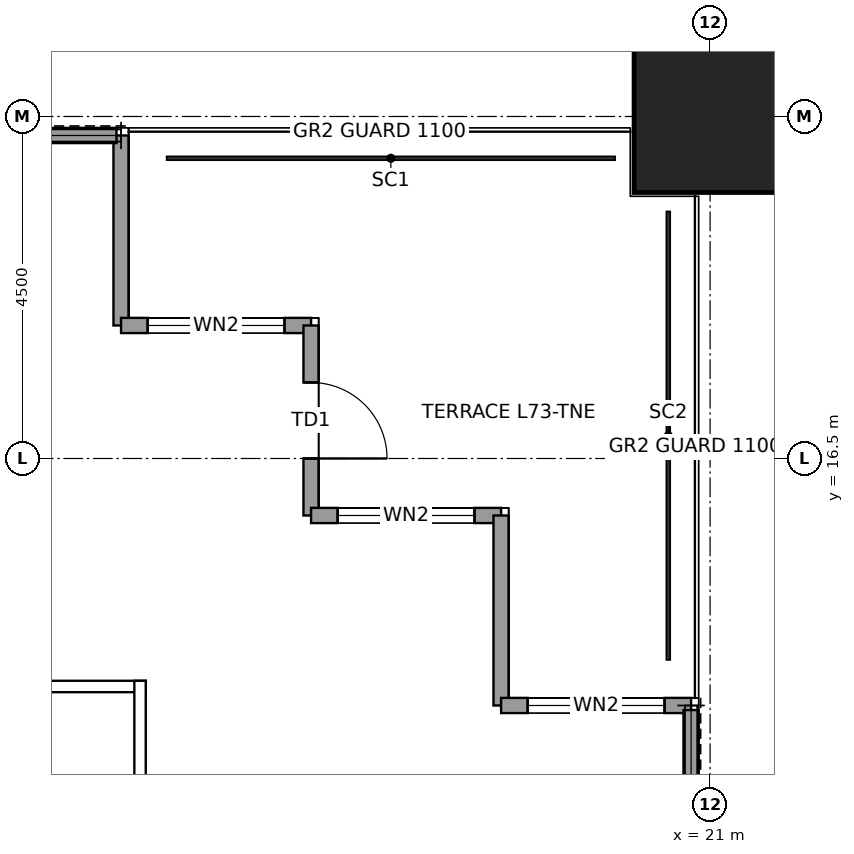
"""IFC4 building model, lengths in metres.
Left out: names, types, materials, properties, quantities, classifications, styles, units other than length and angle.
Written with IfcOpenShell. Run it as: python <this file> out.ifc"""

import sys

from ifc_helpers import new_model, si_unit, direction, frame, frame_2d, origin, origin_2d, place, context, subcontext, project, spatial, rectangle, hollow_rectangle, extrude, element, fill, save


model = new_model("IFC4")
c1 = context("Model", 3, precision=1e-05, world=origin(), true_north=direction((0.0, 1.0)))
c2 = subcontext(c1, "Body", "Model", "MODEL_VIEW")
j1 = project(units=[si_unit("LENGTHUNIT", "METRE"), si_unit("PLANEANGLEUNIT", "RADIAN")], contexts=[c1])
p1 = place(None, origin())
s1 = spatial("IfcSite", under=j1, at=p1, CompositionType="ELEMENT")
p2 = place(p1, origin())
s2 = spatial("IfcBuilding", under=s1, at=p2, CompositionType="ELEMENT")
p3 = place(p2, frame((0.0, 0.0, 327.9)))
s3 = spatial("IfcBuildingStorey", under=s2, at=p3, CompositionType="ELEMENT", Elevation=327.9)
p4 = place(p3, frame((21.0, 21.0, 0.0), z_axis=(0.0, 0.0, 1.0), x_axis=(1.0, 0.0, 0.0)))
e1 = element("IfcColumn", 1, at=p4, inside=s3, PredefinedType="COLUMN", context=c2, shape_type="SweptSolid", body=[
    extrude(hollow_rectangle(XDim=2.0, YDim=2.0, WallThickness=0.095, at=origin_2d()), origin(), (0.0, 0.0, 1.0), 4.0),
])
p5 = place(p3, frame((13.25, 20.75, 0.0), z_axis=(0.0, 0.0, 1.0), x_axis=(0.0, -1.0, 0.0)))
e2 = element("IfcWall", 2, at=p5, inside=s3, PredefinedType="SOLIDWALL", context=c2, shape_type="SweptSolid", body=[
    extrude(rectangle(XDim=2.5, YDim=0.2, at=frame_2d((1.25, 0.0))), origin(), (0.0, 0.0, 1.0), 3.85),
])
p6 = place(p3, frame((13.25, 18.25, 0.0), z_axis=(0.0, 0.0, 1.0), x_axis=(1.0, 0.0, 0.0)))
e3 = element("IfcWall", 3, at=p6, inside=s3, PredefinedType="SOLIDWALL", context=c2, shape_type="SweptSolid", body=[
    extrude(rectangle(XDim=2.5, YDim=0.2, at=frame_2d((1.25, 0.0))), origin(), (0.0, 0.0, 1.0), 3.85),
])
p7 = place(p6, frame((0.35, 0.0, 0.3)))
e4 = element("IfcOpeningElement", 4, at=p7, cuts=e3, PredefinedType="OPENING", context=c2, shape_type="SweptSolid", body=[
    extrude(rectangle(XDim=1.8, YDim=2.4, at=frame_2d((0.9, 1.2))), frame((0.0, 0.11, 0.0), z_axis=(0.0, -1.0, 0.0), x_axis=(1.0, 0.0, 0.0)), (0.0, 0.0, 1.0), 0.22),
])
p8 = place(p3, frame((15.75, 18.25, 0.0), z_axis=(0.0, 0.0, 1.0), x_axis=(0.0, -1.0, 0.0)))
e5 = element("IfcWall", 5, at=p8, inside=s3, PredefinedType="SOLIDWALL", context=c2, shape_type="SweptSolid", body=[
    extrude(rectangle(XDim=2.5, YDim=0.2, at=frame_2d((1.25, 0.0))), origin(), (0.0, 0.0, 1.0), 3.317),
])
p9 = place(p8, frame((0.75, 0.0, 0.0)))
e6 = element("IfcOpeningElement", 6, at=p9, cuts=e5, PredefinedType="OPENING", context=c2, shape_type="SweptSolid", body=[
    extrude(rectangle(XDim=1.0, YDim=2.4, at=frame_2d((0.5, 1.2))), frame((0.0, 0.11, 0.0), z_axis=(0.0, -1.0, 0.0), x_axis=(1.0, 0.0, 0.0)), (0.0, 0.0, 1.0), 0.22),
])
p10 = place(p3, frame((15.75, 15.75, 0.0), z_axis=(0.0, 0.0, 1.0), x_axis=(1.0, 0.0, 0.0)))
e7 = element("IfcWall", 7, at=p10, inside=s3, PredefinedType="SOLIDWALL", context=c2, shape_type="SweptSolid", body=[
    extrude(rectangle(XDim=2.5, YDim=0.2, at=frame_2d((1.25, 0.0))), origin(), (0.0, 0.0, 1.0), 3.85),
])
p11 = place(p10, frame((0.35, 0.0, 0.3)))
e8 = element("IfcOpeningElement", 8, at=p11, cuts=e7, PredefinedType="OPENING", context=c2, shape_type="SweptSolid", body=[
    extrude(rectangle(XDim=1.8, YDim=2.4, at=frame_2d((0.9, 1.2))), frame((0.0, 0.11, 0.0), z_axis=(0.0, -1.0, 0.0), x_axis=(1.0, 0.0, 0.0)), (0.0, 0.0, 1.0), 0.22),
])
p12 = place(p3, frame((18.25, 15.75, 0.0), z_axis=(0.0, 0.0, 1.0), x_axis=(0.0, -1.0, 0.0)))
e9 = element("IfcWall", 9, at=p12, inside=s3, PredefinedType="SOLIDWALL", context=c2, shape_type="SweptSolid", body=[
    extrude(rectangle(XDim=2.5, YDim=0.2, at=frame_2d((1.25, 0.0))), origin(), (0.0, 0.0, 1.0), 3.85),
])
p13 = place(p3, frame((18.25, 13.25, 0.0), z_axis=(0.0, 0.0, 1.0), x_axis=(1.0, 0.0, 0.0)))
e10 = element("IfcWall", 10, at=p13, inside=s3, PredefinedType="SOLIDWALL", context=c2, shape_type="SweptSolid", body=[
    extrude(rectangle(XDim=2.5, YDim=0.2, at=frame_2d((1.25, 0.0))), origin(), (0.0, 0.0, 1.0), 3.85),
])
p14 = place(p13, frame((0.35, 0.0, 0.3)))
e11 = element("IfcOpeningElement", 11, at=p14, cuts=e10, PredefinedType="OPENING", context=c2, shape_type="SweptSolid", body=[
    extrude(rectangle(XDim=1.8, YDim=2.4, at=frame_2d((0.9, 1.2))), frame((0.0, 0.11, 0.0), z_axis=(0.0, -1.0, 0.0), x_axis=(1.0, 0.0, 0.0)), (0.0, 0.0, 1.0), 0.22),
])
for number, where, z_axis, x_axis in (
    (12, (10.435, 20.75, 0.0), (0.0, 0.0, 1.0), (1.0, 0.0, 0.0)),
    (13, (20.75, 13.19, 0.0), (0.0, 0.0, 1.0), (0.0, -1.0, 0.0)),
):
    element("IfcWall", number, at=place(p3, frame(where, z_axis=z_axis, x_axis=x_axis)), inside=s3, PredefinedType="SOLIDWALL", context=c2, shape_type="SweptSolid", body=[
        extrude(rectangle(XDim=2.755, YDim=0.2, at=frame_2d((1.377, 0.0))), origin(), (0.0, 0.0, 1.0), 3.85),
    ])
p15 = place(p3, frame((4.925, 13.5, 0.0), z_axis=(0.0, 0.0, 1.0), x_axis=(1.0, 0.0, 0.0)))
e14 = element("IfcWall", 14, at=p15, inside=s3, PredefinedType="PARTITIONING", context=c2, shape_type="SweptSolid", body=[
    extrude(rectangle(XDim=8.65, YDim=0.15, at=frame_2d((4.325, 0.0))), origin(), (0.0, 0.0, 1.0), 3.85),
])
p16 = place(p3, frame((13.5, 4.925, 0.0), z_axis=(0.0, 0.0, 1.0), x_axis=(0.0, 1.0, 0.0)))
e15 = element("IfcWall", 15, at=p16, inside=s3, PredefinedType="PARTITIONING", context=c2, shape_type="SweptSolid", body=[
    extrude(rectangle(XDim=8.65, YDim=0.15, at=frame_2d((4.325, 0.0))), origin(), (0.0, 0.0, 1.0), 3.85),
])
p17 = place(p16, frame((3.825, 0.0, 0.0)))
e16 = element("IfcOpeningElement", 16, at=p17, cuts=e15, PredefinedType="OPENING", context=c2, shape_type="SweptSolid", body=[
    extrude(rectangle(XDim=1.0, YDim=2.4, at=frame_2d((0.5, 1.2))), frame((0.0, 0.085, 0.0), z_axis=(0.0, -1.0, 0.0), x_axis=(1.0, 0.0, 0.0)), (0.0, 0.0, 1.0), 0.17),
])
p18 = place(p7, origin())
e17 = element("IfcWindow", 17, at=p18, inside=s3, PartitioningType="SINGLE_PANEL", PredefinedType="WINDOW", context=c2, shape_type="SweptSolid", body=[
    extrude(rectangle(XDim=1.8, YDim=2.4, at=frame_2d((0.9, 1.2))), frame((0.0, 0.03, 0.0), z_axis=(0.0, -1.0, 0.0), x_axis=(1.0, 0.0, 0.0)), (0.0, 0.0, 1.0), 0.06),
])
fill(e4, e17)
p19 = place(p9, origin())
e18 = element("IfcDoor", 18, at=p19, inside=s3, OperationType="SINGLE_SWING_RIGHT", PredefinedType="DOOR", context=c2, shape_type="SweptSolid", body=[
    extrude(rectangle(XDim=1.0, YDim=2.4, at=frame_2d((0.5, 1.2))), frame((0.0, 0.025, 0.0), z_axis=(0.0, -1.0, 0.0), x_axis=(1.0, 0.0, 0.0)), (0.0, 0.0, 1.0), 0.05),
])
fill(e6, e18)
p20 = place(p11, origin())
e19 = element("IfcWindow", 19, at=p20, inside=s3, PartitioningType="SINGLE_PANEL", PredefinedType="WINDOW", context=c2, shape_type="SweptSolid", body=[
    extrude(rectangle(XDim=1.8, YDim=2.4, at=frame_2d((0.9, 1.2))), frame((0.0, 0.03, 0.0), z_axis=(0.0, -1.0, 0.0), x_axis=(1.0, 0.0, 0.0)), (0.0, 0.0, 1.0), 0.06),
])
fill(e8, e19)
p21 = place(p14, origin())
e20 = element("IfcWindow", 20, at=p21, inside=s3, PartitioningType="SINGLE_PANEL", PredefinedType="WINDOW", context=c2, shape_type="SweptSolid", body=[
    extrude(rectangle(XDim=1.8, YDim=2.4, at=frame_2d((0.9, 1.2))), frame((0.0, 0.03, 0.0), z_axis=(0.0, -1.0, 0.0), x_axis=(1.0, 0.0, 0.0)), (0.0, 0.0, 1.0), 0.06),
])
fill(e11, e20)
save(model, sys.argv[1])
